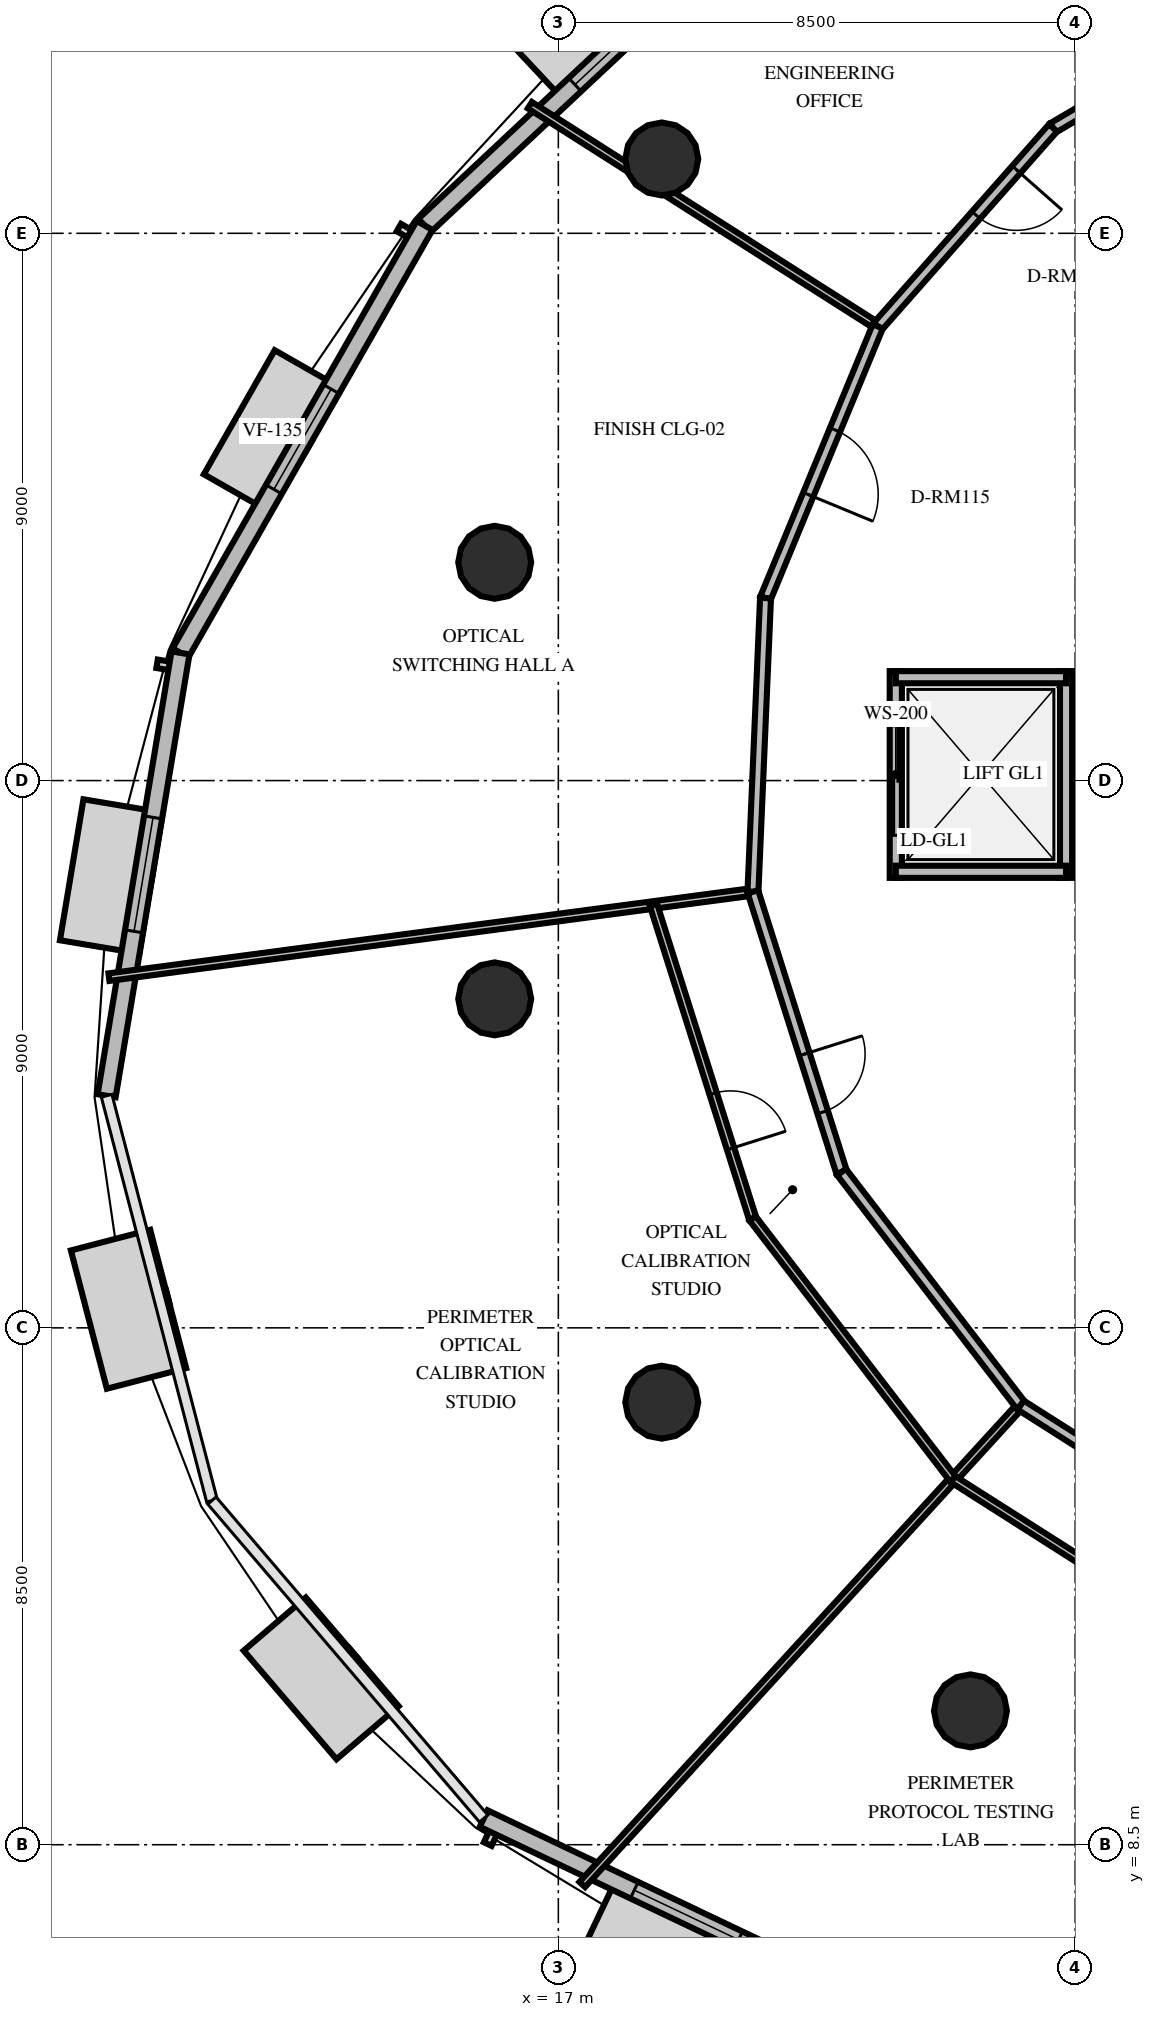
"""IFC4 building model, lengths in metres.
Left out: names, types, materials, properties, quantities, classifications, styles, units other than length and angle.
Written with IfcOpenShell. Run it as: python <this file> out.ifc"""

import sys

from ifc_helpers import new_model, si_unit, direction, frame, frame_2d, origin, origin_2d, place, context, subcontext, project, spatial, rectangle, circle, extrude, element, fill, save


model = new_model("IFC4")
c1 = context("Model", 3, precision=1e-05, world=origin(), true_north=direction((0.0, 1.0)))
c2 = subcontext(c1, "Body", "Model", "MODEL_VIEW")
j1 = project(units=[si_unit("LENGTHUNIT", "METRE"), si_unit("PLANEANGLEUNIT", "RADIAN")], contexts=[c1])
p1 = place(None, origin())
s1 = spatial("IfcSite", under=j1, at=p1, CompositionType="ELEMENT")
p2 = place(p1, origin())
s2 = spatial("IfcBuilding", under=s1, at=p2, CompositionType="ELEMENT")
p3 = place(p2, frame((0.0, 0.0, 149.8)))
s3 = spatial("IfcBuildingStorey", under=s2, at=p3, CompositionType="ELEMENT", Elevation=149.8)
for number, where, z_axis, x_axis in (
    (1, (18.701, 36.222, 0.0), (0.0, 0.0, 1.0), (1.0, 0.0, 0.0)),
    (2, (15.954, 29.59, 0.0), (0.0, 0.0, 1.0), (1.0, 0.0, 0.0)),
    (3, (15.954, 22.41, 0.0), (0.0, 0.0, 1.0), (1.0, 0.0, 0.0)),
    (4, (18.701, 15.778, 0.0), (0.0, 0.0, 1.0), (1.0, 0.0, 0.0)),
    (5, (23.778, 10.701, 0.0), (0.0, 0.0, 1.0), (1.0, 0.0, 0.0)),
):
    element("IfcColumn", number, at=place(p3, frame(where, z_axis=z_axis, x_axis=x_axis)), inside=s3, PredefinedType="COLUMN", context=c2, shape_type="SweptSolid", body=[
        extrude(circle(Radius=0.6, at=origin_2d()), origin(), (0.0, 0.0, 1.0), 4.0),
    ])
p4 = place(p3, frame((21.131, 41.057, 0.0), z_axis=(0.0, 0.0, 1.0), x_axis=(-0.729921586767, -0.683530889698, 0.0)))
e6 = element("IfcWall", 6, at=p4, inside=s3, PredefinedType="SOLIDWALL", context=c2, shape_type="SweptSolid", body=[
    extrude(rectangle(XDim=8.673, YDim=0.3, at=frame_2d((4.336, 0.0))), origin(), (0.0, 0.0, 1.0), 2.9),
])
p5 = place(p4, frame((3.386, 0.0, 0.8)))
e7 = element("IfcOpeningElement", 7, at=p5, cuts=e6, PredefinedType="OPENING", context=c2, shape_type="SweptSolid", body=[
    extrude(rectangle(XDim=1.9, YDim=1.95, at=frame_2d((0.95, 0.975))), frame((0.0, 0.16, 0.0), z_axis=(0.0, -1.0, 0.0), x_axis=(1.0, 0.0, 0.0)), (0.0, 0.0, 1.0), 0.32),
])
p6 = place(p3, frame((14.801, 35.129, 0.0), z_axis=(0.0, 0.0, 1.0), x_axis=(-0.495931060513, -0.868361896457, 0.0)))
e8 = element("IfcWall", 8, at=p6, inside=s3, PredefinedType="SOLIDWALL", context=c2, shape_type="SweptSolid", body=[
    extrude(rectangle(XDim=8.095, YDim=0.3, at=frame_2d((4.048, 0.0))), origin(), (0.0, 0.0, 1.0), 2.9),
])
p7 = place(p6, frame((3.098, 0.0, 0.8)))
e9 = element("IfcOpeningElement", 9, at=p7, cuts=e8, PredefinedType="OPENING", context=c2, shape_type="SweptSolid", body=[
    extrude(rectangle(XDim=1.9, YDim=1.95, at=frame_2d((0.95, 0.975))), frame((0.0, 0.16, 0.0), z_axis=(0.0, -1.0, 0.0), x_axis=(1.0, 0.0, 0.0)), (0.0, 0.0, 1.0), 0.32),
])
p8 = place(p3, frame((10.786, 28.1, 0.0), z_axis=(0.0, 0.0, 1.0), x_axis=(-0.16453840075, -0.986370678132, 0.0)))
e10 = element("IfcWall", 10, at=p8, inside=s3, PredefinedType="SOLIDWALL", context=c2, shape_type="SweptSolid", body=[
    extrude(rectangle(XDim=7.383, YDim=0.3, at=frame_2d((3.692, 0.0))), origin(), (0.0, 0.0, 1.0), 2.9),
])
p9 = place(p8, frame((2.742, 0.0, 0.8)))
e11 = element("IfcOpeningElement", 11, at=p9, cuts=e10, PredefinedType="OPENING", context=c2, shape_type="SweptSolid", body=[
    extrude(rectangle(XDim=1.9, YDim=1.95, at=frame_2d((0.95, 0.975))), frame((0.0, 0.16, 0.0), z_axis=(0.0, -1.0, 0.0), x_axis=(1.0, 0.0, 0.0)), (0.0, 0.0, 1.0), 0.32),
])
p10 = place(p3, frame((15.772, 8.93, 0.0), z_axis=(0.0, 0.0, 1.0), x_axis=(0.90311340401, -0.429402118646, 0.0)))
e12 = element("IfcWall", 12, at=p10, inside=s3, PredefinedType="SOLIDWALL", context=c2, shape_type="SweptSolid", body=[
    extrude(rectangle(XDim=7.383, YDim=0.3, at=frame_2d((3.692, 0.0))), origin(), (0.0, 0.0, 1.0), 2.9),
])
p11 = place(p10, frame((2.742, 0.0, 0.8)))
e13 = element("IfcOpeningElement", 13, at=p11, cuts=e12, PredefinedType="OPENING", context=c2, shape_type="SweptSolid", body=[
    extrude(rectangle(XDim=1.9, YDim=1.95, at=frame_2d((0.95, 0.975))), frame((0.0, 0.16, 0.0), z_axis=(0.0, -1.0, 0.0), x_axis=(1.0, 0.0, 0.0)), (0.0, 0.0, 1.0), 0.32),
])
p12 = place(p3, frame((22.55, 24.4, 0.0), z_axis=(0.0, 0.0, 1.0), x_axis=(0.0, 1.0, 0.0)))
e14 = element("IfcWall", 14, at=p12, inside=s3, PredefinedType="SOLIDWALL", context=c2, shape_type="SweptSolid", body=[
    extrude(rectangle(XDim=3.4, YDim=0.2, at=frame_2d((1.7, 0.0))), origin(), (0.0, 0.0, 1.0), 2.8),
])
p13 = place(p12, frame((0.7, 0.0, 0.0)))
e15 = element("IfcOpeningElement", 15, at=p13, cuts=e14, PredefinedType="OPENING", context=c2, shape_type="SweptSolid", body=[
    extrude(rectangle(XDim=1.8, YDim=2.4, at=frame_2d((0.9, 1.2))), frame((0.0, 0.11, 0.0), z_axis=(0.0, -1.0, 0.0), x_axis=(1.0, 0.0, 0.0)), (0.0, 0.0, 1.0), 0.22),
])
p14 = place(p3, frame((25.35, 24.4, 0.0), z_axis=(0.0, 0.0, 1.0), x_axis=(0.0, 1.0, 0.0)))
e16 = element("IfcWall", 16, at=p14, inside=s3, PredefinedType="SOLIDWALL", context=c2, shape_type="SweptSolid", body=[
    extrude(rectangle(XDim=3.4, YDim=0.2, at=frame_2d((1.7, 0.0))), origin(), (0.0, 0.0, 1.0), 2.8),
])
for number, where, z_axis, x_axis in (
    (17, (22.55, 24.5, 0.0), (0.0, 0.0, 1.0), (1.0, 0.0, 0.0)),
    (18, (22.55, 27.7, 0.0), (0.0, 0.0, 1.0), (1.0, 0.0, 0.0)),
):
    element("IfcWall", number, at=place(p3, frame(where, z_axis=z_axis, x_axis=x_axis)), inside=s3, PredefinedType="SOLIDWALL", context=c2, shape_type="SweptSolid", body=[
        extrude(rectangle(XDim=2.8, YDim=0.2, at=frame_2d((1.4, 0.0))), origin(), (0.0, 0.0, 1.0), 2.8),
    ])
p15 = place(p3, frame((22.253, 33.469, 0.0), z_axis=(0.0, 0.0, 1.0), x_axis=(-0.843860112371, 0.536563240215, 0.0)))
e19 = element("IfcWall", 19, at=p15, inside=s3, PredefinedType="PARTITIONING", context=c2, shape_type="SweptSolid", body=[
    extrude(rectangle(XDim=6.78, YDim=0.125, at=frame_2d((3.39, 0.0))), origin(), (0.0, 0.0, 1.0), 2.8),
])
p16 = place(p3, frame((28.887, 38.947, 0.0), z_axis=(0.0, 0.0, 1.0), x_axis=(-0.861185337558, -0.508291072493, 0.0)))
e20 = element("IfcWall", 20, at=p16, inside=s3, PredefinedType="PARTITIONING", context=c2, shape_type="SweptSolid", body=[
    extrude(rectangle(XDim=4.355, YDim=0.18, at=frame_2d((2.177, 0.0))), origin(), (0.0, 0.0, 1.0), 2.8),
])
p17 = place(p3, frame((25.136, 36.733, 0.0), z_axis=(0.0, 0.0, 1.0), x_axis=(-0.661970118679, -0.749530227526, 0.0)))
e21 = element("IfcWall", 21, at=p17, inside=s3, PredefinedType="PARTITIONING", context=c2, shape_type="SweptSolid", body=[
    extrude(rectangle(XDim=4.355, YDim=0.18, at=frame_2d((2.178, 0.0))), origin(), (0.0, 0.0, 1.0), 2.8),
])
p18 = place(p17, frame((0.914, 0.0, 0.0)))
e22 = element("IfcOpeningElement", 22, at=p18, cuts=e21, PredefinedType="OPENING", context=c2, shape_type="SweptSolid", body=[
    extrude(rectangle(XDim=1.0, YDim=2.15, at=frame_2d((0.5, 1.075))), frame((0.0, 0.1, 0.0), z_axis=(0.0, -1.0, 0.0), x_axis=(1.0, 0.0, 0.0)), (0.0, 0.0, 1.0), 0.2),
])
p19 = place(p3, frame((20.201, 24.171, 0.0), z_axis=(0.0, 0.0, 1.0), x_axis=(-0.991330577482, -0.131391347314, 0.0)))
e23 = element("IfcWall", 23, at=p19, inside=s3, PredefinedType="PARTITIONING", context=c2, shape_type="SweptSolid", body=[
    extrude(rectangle(XDim=10.684, YDim=0.125, at=frame_2d((5.342, 0.0))), origin(), (0.0, 0.0, 1.0), 2.8),
])
p20 = place(p3, frame((22.253, 33.469, 0.0), z_axis=(0.0, 0.0, 1.0), x_axis=(-0.381884883338, -0.924209898171, 0.0)))
e24 = element("IfcWall", 24, at=p20, inside=s3, PredefinedType="PARTITIONING", context=c2, shape_type="SweptSolid", body=[
    extrude(rectangle(XDim=4.834, YDim=0.18, at=frame_2d((2.417, 0.0))), origin(), (0.0, 0.0, 1.0), 2.8),
])
p21 = place(p20, frame((1.842, 0.0, 0.0)))
e25 = element("IfcOpeningElement", 25, at=p21, cuts=e24, PredefinedType="OPENING", context=c2, shape_type="SweptSolid", body=[
    extrude(rectangle(XDim=1.15, YDim=2.15, at=frame_2d((0.575, 1.075))), frame((0.0, 0.1, 0.0), z_axis=(0.0, -1.0, 0.0), x_axis=(1.0, 0.0, 0.0)), (0.0, 0.0, 1.0), 0.2),
])
p22 = place(p3, frame((20.407, 29.001, 0.0), z_axis=(0.0, 0.0, 1.0), x_axis=(-0.042722784695, -0.999086965018, 0.0)))
e26 = element("IfcWall", 26, at=p22, inside=s3, PredefinedType="PARTITIONING", context=c2, shape_type="SweptSolid", body=[
    extrude(rectangle(XDim=4.834, YDim=0.18, at=frame_2d((2.417, 0.0))), origin(), (0.0, 0.0, 1.0), 2.8),
])
p23 = place(p3, frame((24.605, 15.729, 0.0), z_axis=(0.0, 0.0, 1.0), x_axis=(-0.674940942489, -0.737871753188, 0.0)))
e27 = element("IfcWall", 27, at=p23, inside=s3, PredefinedType="PARTITIONING", context=c2, shape_type="SweptSolid", body=[
    extrude(rectangle(XDim=10.684, YDim=0.125, at=frame_2d((5.342, 0.0))), origin(), (0.0, 0.0, 1.0), 2.8),
])
p24 = place(p3, frame((20.201, 24.171, 0.0), z_axis=(0.0, 0.0, 1.0), x_axis=(0.301554318109, -0.953448998757, 0.0)))
e28 = element("IfcWall", 28, at=p24, inside=s3, PredefinedType="PARTITIONING", context=c2, shape_type="SweptSolid", body=[
    extrude(rectangle(XDim=4.834, YDim=0.18, at=frame_2d((2.417, 0.0))), origin(), (0.0, 0.0, 1.0), 2.8),
])
p25 = place(p24, frame((2.801, 0.0, 0.0)))
e29 = element("IfcOpeningElement", 29, at=p25, cuts=e28, PredefinedType="OPENING", context=c2, shape_type="SweptSolid", body=[
    extrude(rectangle(XDim=1.0, YDim=2.15, at=frame_2d((0.5, 1.075))), frame((0.0, 0.1, 0.0), z_axis=(0.0, -1.0, 0.0), x_axis=(1.0, 0.0, 0.0)), (0.0, 0.0, 1.0), 0.2),
])
p26 = place(p3, frame((21.658, 19.562, 0.0), z_axis=(0.0, 0.0, 1.0), x_axis=(0.609452025555, -0.792822949054, 0.0)))
e30 = element("IfcWall", 30, at=p26, inside=s3, PredefinedType="PARTITIONING", context=c2, shape_type="SweptSolid", body=[
    extrude(rectangle(XDim=4.834, YDim=0.18, at=frame_2d((2.417, 0.0))), origin(), (0.0, 0.0, 1.0), 2.8),
])
p27 = place(p3, frame((18.565, 23.954, 0.0), z_axis=(0.0, 0.0, 1.0), x_axis=(0.301561349151, -0.953446774969, 0.0)))
e31 = element("IfcWall", 31, at=p27, inside=s3, PredefinedType="PARTITIONING", context=c2, shape_type="SweptSolid", body=[
    extrude(rectangle(XDim=5.407, YDim=0.125, at=frame_2d((2.704, 0.0))), origin(), (0.0, 0.0, 1.0), 2.8),
])
p28 = place(p27, frame((3.253, 0.0, 0.0)))
e32 = element("IfcOpeningElement", 32, at=p28, cuts=e31, PredefinedType="OPENING", context=c2, shape_type="SweptSolid", body=[
    extrude(rectangle(XDim=0.95, YDim=2.15, at=frame_2d((0.475, 1.075))), frame((0.0, 0.073, 0.0), z_axis=(0.0, -1.0, 0.0), x_axis=(1.0, 0.0, 0.0)), (0.0, 0.0, 1.0), 0.145),
])
p29 = place(p3, frame((20.196, 18.799, 0.0), z_axis=(0.0, 0.0, 1.0), x_axis=(0.609464175054, -0.792813609448, 0.0)))
e33 = element("IfcWall", 33, at=p29, inside=s3, PredefinedType="PARTITIONING", context=c2, shape_type="SweptSolid", body=[
    extrude(rectangle(XDim=5.407, YDim=0.125, at=frame_2d((2.704, 0.0))), origin(), (0.0, 0.0, 1.0), 2.8),
])
p30 = place(p3, frame((24.605, 15.729, 0.0), z_axis=(0.0, 0.0, 1.0), x_axis=(0.843858975669, -0.536565027916, 0.0)))
e34 = element("IfcWall", 34, at=p30, inside=s3, PredefinedType="PARTITIONING", context=c2, shape_type="SweptSolid", body=[
    extrude(rectangle(XDim=4.834, YDim=0.18, at=frame_2d((2.417, 0.0))), origin(), (0.0, 0.0, 1.0), 2.8),
])
p31 = place(p30, frame((2.801, 0.0, 0.0)))
e35 = element("IfcOpeningElement", 35, at=p31, cuts=e34, PredefinedType="OPENING", context=c2, shape_type="SweptSolid", body=[
    extrude(rectangle(XDim=1.0, YDim=2.15, at=frame_2d((0.5, 1.075))), frame((0.0, 0.1, 0.0), z_axis=(0.0, -1.0, 0.0), x_axis=(1.0, 0.0, 0.0)), (0.0, 0.0, 1.0), 0.2),
])
p32 = place(p3, frame((23.491, 14.511, 0.0), z_axis=(0.0, 0.0, 1.0), x_axis=(0.843858498534, -0.536565778308, 0.0)))
e36 = element("IfcWall", 36, at=p32, inside=s3, PredefinedType="PARTITIONING", context=c2, shape_type="SweptSolid", body=[
    extrude(rectangle(XDim=5.407, YDim=0.125, at=frame_2d((2.704, 0.0))), origin(), (0.0, 0.0, 1.0), 2.8),
])
p33 = place(p32, frame((3.253, 0.0, 0.0)))
e37 = element("IfcOpeningElement", 37, at=p33, cuts=e36, PredefinedType="OPENING", context=c2, shape_type="SweptSolid", body=[
    extrude(rectangle(XDim=0.95, YDim=2.15, at=frame_2d((0.475, 1.075))), frame((0.0, 0.073, 0.0), z_axis=(0.0, -1.0, 0.0), x_axis=(1.0, 0.0, 0.0)), (0.0, 0.0, 1.0), 0.145),
])
p34 = place(p5, origin())
e38 = element("IfcWindow", 38, at=p34, inside=s3, PartitioningType="SINGLE_PANEL", PredefinedType="WINDOW", context=c2, shape_type="SweptSolid", body=[
    extrude(rectangle(XDim=1.9, YDim=1.95, at=frame_2d((0.95, 0.975))), frame((0.0, 0.03, 0.0), z_axis=(0.0, -1.0, 0.0), x_axis=(1.0, 0.0, 0.0)), (0.0, 0.0, 1.0), 0.06),
])
fill(e7, e38)
p35 = place(p7, origin())
e39 = element("IfcWindow", 39, at=p35, inside=s3, PartitioningType="SINGLE_PANEL", PredefinedType="WINDOW", context=c2, shape_type="SweptSolid", body=[
    extrude(rectangle(XDim=1.9, YDim=1.95, at=frame_2d((0.95, 0.975))), frame((0.0, 0.03, 0.0), z_axis=(0.0, -1.0, 0.0), x_axis=(1.0, 0.0, 0.0)), (0.0, 0.0, 1.0), 0.06),
])
fill(e9, e39)
p36 = place(p9, origin())
e40 = element("IfcWindow", 40, at=p36, inside=s3, PartitioningType="SINGLE_PANEL", PredefinedType="WINDOW", context=c2, shape_type="SweptSolid", body=[
    extrude(rectangle(XDim=1.9, YDim=1.95, at=frame_2d((0.95, 0.975))), frame((0.0, 0.03, 0.0), z_axis=(0.0, -1.0, 0.0), x_axis=(1.0, 0.0, 0.0)), (0.0, 0.0, 1.0), 0.06),
])
fill(e11, e40)
p37 = place(p11, origin())
e41 = element("IfcWindow", 41, at=p37, inside=s3, PartitioningType="SINGLE_PANEL", PredefinedType="WINDOW", context=c2, shape_type="SweptSolid", body=[
    extrude(rectangle(XDim=1.9, YDim=1.95, at=frame_2d((0.95, 0.975))), frame((0.0, 0.03, 0.0), z_axis=(0.0, -1.0, 0.0), x_axis=(1.0, 0.0, 0.0)), (0.0, 0.0, 1.0), 0.06),
])
fill(e13, e41)
p38 = place(p13, origin())
e42 = element("IfcDoor", 42, at=p38, inside=s3, OperationType="DOUBLE_DOOR_SLIDING", PredefinedType="USERDEFINED", context=c2, shape_type="SweptSolid", body=[
    extrude(rectangle(XDim=1.8, YDim=2.4, at=frame_2d((0.9, 1.2))), frame((0.0, 0.025, 0.0), z_axis=(0.0, -1.0, 0.0), x_axis=(1.0, 0.0, 0.0)), (0.0, 0.0, 1.0), 0.05),
])
fill(e15, e42)
p39 = place(p18, origin())
e43 = element("IfcDoor", 43, at=p39, inside=s3, OperationType="SINGLE_SWING_LEFT", PredefinedType="DOOR", context=c2, shape_type="SweptSolid", body=[
    extrude(rectangle(XDim=1.0, YDim=2.15, at=frame_2d((0.5, 1.075))), frame((0.0, 0.025, 0.0), z_axis=(0.0, -1.0, 0.0), x_axis=(1.0, 0.0, 0.0)), (0.0, 0.0, 1.0), 0.05),
])
fill(e22, e43)
p40 = place(p21, origin())
e44 = element("IfcDoor", 44, at=p40, inside=s3, OperationType="SINGLE_SWING_RIGHT", PredefinedType="DOOR", context=c2, shape_type="SweptSolid", body=[
    extrude(rectangle(XDim=1.15, YDim=2.15, at=frame_2d((0.575, 1.075))), frame((0.0, 0.025, 0.0), z_axis=(0.0, -1.0, 0.0), x_axis=(1.0, 0.0, 0.0)), (0.0, 0.0, 1.0), 0.05),
])
fill(e25, e44)
p41 = place(p25, origin())
e45 = element("IfcDoor", 45, at=p41, inside=s3, OperationType="SINGLE_SWING_LEFT", PredefinedType="DOOR", context=c2, shape_type="SweptSolid", body=[
    extrude(rectangle(XDim=1.0, YDim=2.15, at=frame_2d((0.5, 1.075))), frame((0.0, 0.025, 0.0), z_axis=(0.0, -1.0, 0.0), x_axis=(1.0, 0.0, 0.0)), (0.0, 0.0, 1.0), 0.05),
])
fill(e29, e45)
p42 = place(p28, origin())
e46 = element("IfcDoor", 46, at=p42, inside=s3, OperationType="SINGLE_SWING_RIGHT", PredefinedType="DOOR", context=c2, shape_type="SweptSolid", body=[
    extrude(rectangle(XDim=0.95, YDim=2.15, at=frame_2d((0.475, 1.075))), frame((0.0, 0.025, 0.0), z_axis=(0.0, -1.0, 0.0), x_axis=(1.0, 0.0, 0.0)), (0.0, 0.0, 1.0), 0.05),
])
fill(e32, e46)
save(model, sys.argv[1])
